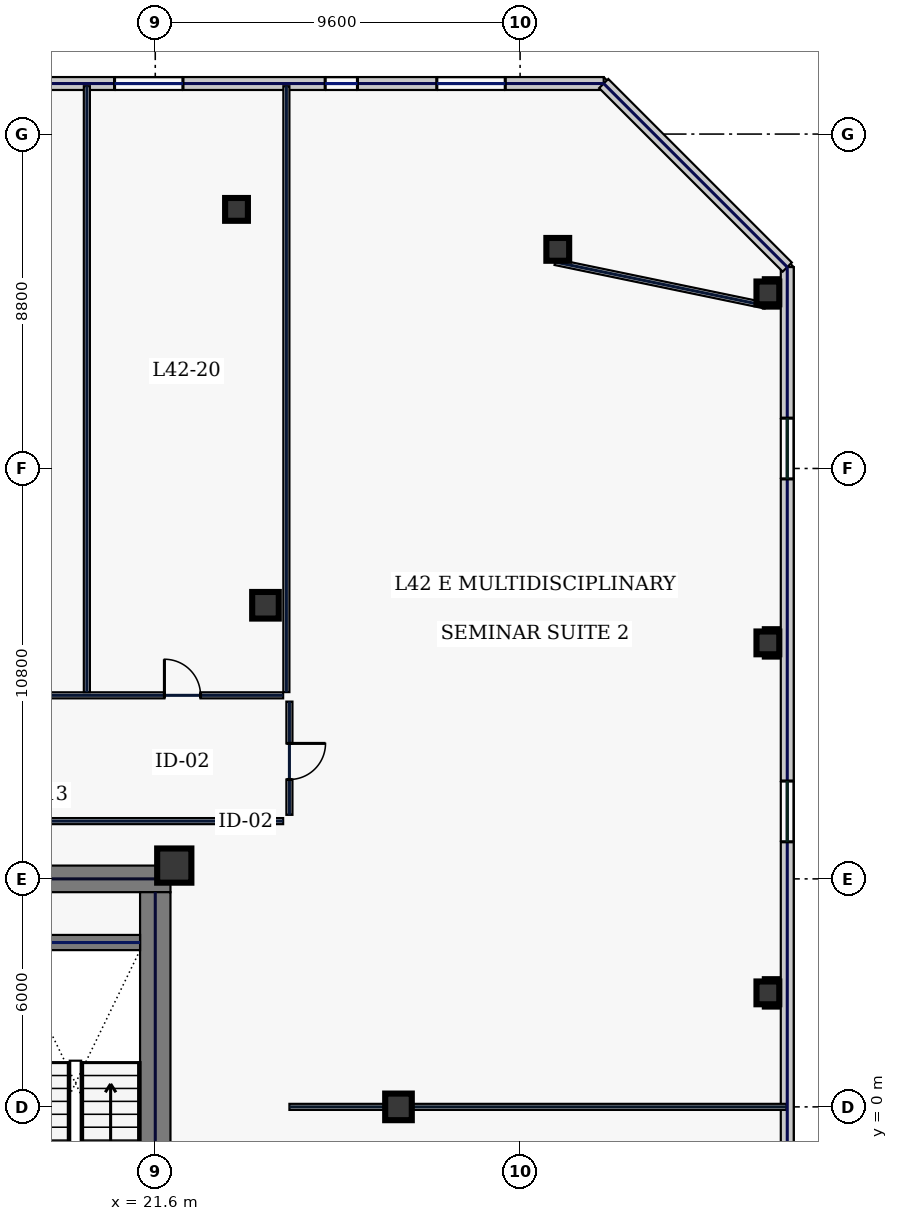
"""IFC4 building model, lengths in metres.
Left out: names, types, materials, properties, quantities, classifications, styles, units other than length and angle.
Written with IfcOpenShell. Run it as: python <this file> out.ifc"""

import sys

from ifc_helpers import new_model, si_unit, direction, frame, frame_2d, origin, origin_2d, place, context, subcontext, project, spatial, rectangle, hollow_rectangle, extrude, element, fill, save


model = new_model("IFC4")
c1 = context("Model", 3, precision=1e-05, world=origin(), true_north=direction((0.0, 1.0)))
c2 = subcontext(c1, "Body", "Model", "MODEL_VIEW")
j1 = project(units=[si_unit("LENGTHUNIT", "METRE"), si_unit("PLANEANGLEUNIT", "RADIAN")], contexts=[c1])
p1 = place(None, origin())
s1 = spatial("IfcSite", under=j1, at=p1, CompositionType="ELEMENT")
p2 = place(p1, origin())
s2 = spatial("IfcBuilding", under=s1, at=p2, CompositionType="ELEMENT")
p3 = place(p2, frame((0.0, 0.0, 184.2)))
s3 = spatial("IfcBuildingStorey", under=s2, at=p3, CompositionType="ELEMENT", Elevation=184.2)
p4 = place(p3, frame((10.45, 6.0, 0.0), z_axis=(0.0, 0.0, 1.0), x_axis=(1.0, 0.0, 0.0)))
e1 = element("IfcWall", 1, at=p4, inside=s3, PredefinedType="SHEAR", context=c2, shape_type="SweptSolid", body=[
    extrude(rectangle(XDim=11.55, YDim=0.7, at=frame_2d((5.775, 0.0))), origin(), (0.0, 0.0, 1.0), 3.74),
])
p5 = place(p3, frame((21.6, -5.65, 0.0), z_axis=(0.0, 0.0, 1.0), x_axis=(0.0, 1.0, 0.0)))
e2 = element("IfcWall", 2, at=p5, inside=s3, PredefinedType="SHEAR", context=c2, shape_type="SweptSolid", body=[
    extrude(rectangle(XDim=11.3, YDim=0.8, at=frame_2d((5.65, 0.0))), origin(), (0.0, 0.0, 1.0), 3.74),
])
p6 = place(p3, frame((17.8, 4.325, 0.0), z_axis=(0.0, 0.0, 1.0), x_axis=(1.0, 0.0, 0.0)))
e3 = element("IfcWall", 3, at=p6, inside=s3, PredefinedType="SHEAR", context=c2, shape_type="SweptSolid", body=[
    extrude(rectangle(XDim=3.4, YDim=0.4, at=frame_2d((1.7, 0.0))), origin(), (0.0, 0.0, 1.0), 3.74),
])
p7 = place(p3, frame((22.1, 6.35, 0.0), z_axis=(0.0, 0.0, 1.0), x_axis=(1.0, 0.0, 0.0)))
e4 = element("IfcColumn", 4, at=p7, inside=s3, PredefinedType="COLUMN", context=c2, shape_type="SweptSolid", body=[
    extrude(hollow_rectangle(XDim=0.9, YDim=0.9, WallThickness=0.04, at=origin_2d()), origin(), (0.0, 0.0, 1.0), 3.74),
])
for number, where, z_axis, x_axis in (
    (5, (24.5, 13.2, 0.0), (0.0, 0.0, 1.0), (1.0, 0.0, 0.0)),
    (6, (28.0, 0.0, 0.0), (0.0, 0.0, 1.0), (1.0, 0.0, 0.0)),
):
    element("IfcColumn", number, at=place(p3, frame(where, z_axis=z_axis, x_axis=x_axis)), inside=s3, PredefinedType="COLUMN", context=c2, shape_type="SweptSolid", body=[
        extrude(hollow_rectangle(XDim=0.7, YDim=0.7, WallThickness=0.032, at=origin_2d()), origin(), (0.0, 0.0, 1.0), 3.74),
    ])
for number, where, z_axis, x_axis in (
    (7, (32.191, 22.566, 0.0), (0.0, 0.0, 1.0), (1.0, 0.0, 0.0)),
    (8, (23.738, 23.618, 0.0), (0.0, 0.0, 1.0), (1.0, 0.0, 0.0)),
    (9, (37.72, 3.0, 0.0), (0.0, 0.0, 1.0), (1.0, 0.0, 0.0)),
    (10, (37.72, 12.21, 0.0), (0.0, 0.0, 1.0), (1.0, 0.0, 0.0)),
    (11, (37.72, 21.42, 0.0), (0.0, 0.0, 1.0), (1.0, 0.0, 0.0)),
):
    element("IfcColumn", number, at=place(p3, frame(where, z_axis=z_axis, x_axis=x_axis)), inside=s3, PredefinedType="COLUMN", context=c2, shape_type="SweptSolid", body=[
        extrude(hollow_rectangle(XDim=0.6, YDim=0.6, WallThickness=0.028, at=origin_2d()), origin(), (0.0, 0.0, 1.0), 3.74),
    ])
p8 = place(p3, frame((33.4, 26.93, 0.0), z_axis=(0.0, 0.0, 1.0), x_axis=(-1.0, 0.0, 0.0)))
e12 = element("IfcWall", 12, at=p8, inside=s3, PredefinedType="STANDARD", context=c2, shape_type="SweptSolid", body=[
    extrude(rectangle(XDim=15.95, YDim=0.34, at=frame_2d((7.975, 0.0))), origin(), (0.0, 0.0, 1.0), 3.74),
])
p9 = place(p8, frame((11.071, 0.0, 0.7)))
e13 = element("IfcOpeningElement", 13, at=p9, cuts=e12, PredefinedType="OPENING", context=c2, shape_type="SweptSolid", body=[
    extrude(rectangle(XDim=1.8, YDim=2.2, at=frame_2d((0.9, 1.1))), frame((0.0, 0.18, 0.0), z_axis=(0.0, -1.0, 0.0), x_axis=(1.0, 0.0, 0.0)), (0.0, 0.0, 1.0), 0.36),
])
p10 = place(p8, frame((6.48, 0.0, 0.7)))
e14 = element("IfcOpeningElement", 14, at=p10, cuts=e12, PredefinedType="OPENING", context=c2, shape_type="SweptSolid", body=[
    extrude(rectangle(XDim=0.85, YDim=1.85, at=frame_2d((0.425, 0.925))), frame((0.0, 0.18, 0.0), z_axis=(0.0, -1.0, 0.0), x_axis=(1.0, 0.0, 0.0)), (0.0, 0.0, 1.0), 0.36),
])
p11 = place(p8, frame((2.591, 0.0, 0.7)))
e15 = element("IfcOpeningElement", 15, at=p11, cuts=e12, PredefinedType="OPENING", context=c2, shape_type="SweptSolid", body=[
    extrude(rectangle(XDim=1.8, YDim=2.2, at=frame_2d((0.9, 1.1))), frame((0.0, 0.18, 0.0), z_axis=(0.0, -1.0, 0.0), x_axis=(1.0, 0.0, 0.0)), (0.0, 0.0, 1.0), 0.36),
])
p12 = place(p3, frame((38.23, -16.1, 0.0), z_axis=(0.0, 0.0, 1.0), x_axis=(0.0, 1.0, 0.0)))
e16 = element("IfcWall", 16, at=p12, inside=s3, PredefinedType="STANDARD", context=c2, shape_type="SweptSolid", body=[
    extrude(rectangle(XDim=38.2, YDim=0.34, at=frame_2d((19.1, 0.0))), origin(), (0.0, 0.0, 1.0), 3.74),
])
p13 = place(p12, frame((3.975, 0.0, 0.58)))
e17 = element("IfcOpeningElement", 17, at=p13, cuts=e16, PredefinedType="OPENING", context=c2, shape_type="SweptSolid", body=[
    extrude(rectangle(XDim=1.6, YDim=2.3, at=frame_2d((0.8, 1.15))), frame((0.0, 0.18, 0.0), z_axis=(0.0, -1.0, 0.0), x_axis=(1.0, 0.0, 0.0)), (0.0, 0.0, 1.0), 0.36),
])
p14 = place(p12, frame((13.525, 0.0, 0.58)))
e18 = element("IfcOpeningElement", 18, at=p14, cuts=e16, PredefinedType="OPENING", context=c2, shape_type="SweptSolid", body=[
    extrude(rectangle(XDim=1.6, YDim=2.3, at=frame_2d((0.8, 1.15))), frame((0.0, 0.18, 0.0), z_axis=(0.0, -1.0, 0.0), x_axis=(1.0, 0.0, 0.0)), (0.0, 0.0, 1.0), 0.36),
])
p15 = place(p12, frame((23.075, 0.0, 0.58)))
e19 = element("IfcOpeningElement", 19, at=p15, cuts=e16, PredefinedType="OPENING", context=c2, shape_type="SweptSolid", body=[
    extrude(rectangle(XDim=1.6, YDim=2.3, at=frame_2d((0.8, 1.15))), frame((0.0, 0.18, 0.0), z_axis=(0.0, -1.0, 0.0), x_axis=(1.0, 0.0, 0.0)), (0.0, 0.0, 1.0), 0.36),
])
p16 = place(p12, frame((32.625, 0.0, 0.58)))
e20 = element("IfcOpeningElement", 20, at=p16, cuts=e16, PredefinedType="OPENING", context=c2, shape_type="SweptSolid", body=[
    extrude(rectangle(XDim=1.6, YDim=2.3, at=frame_2d((0.8, 1.15))), frame((0.0, 0.18, 0.0), z_axis=(0.0, -1.0, 0.0), x_axis=(1.0, 0.0, 0.0)), (0.0, 0.0, 1.0), 0.36),
])
p17 = place(p3, frame((38.23, 22.1, 0.0), z_axis=(0.0, 0.0, 1.0), x_axis=(-0.707124652085, 0.707088909836, 0.0)))
e21 = element("IfcWall", 21, at=p17, inside=s3, PredefinedType="STANDARD", context=c2, shape_type="SweptSolid", body=[
    extrude(rectangle(XDim=6.831, YDim=0.34, at=frame_2d((3.415, 0.0))), origin(), (0.0, 0.0, 1.0), 3.74),
])
p18 = place(p3, frame((37.651, 21.087, 0.0), z_axis=(0.0, 0.0, 1.0), x_axis=(-0.979184618318, 0.202971631636, 0.0)))
e22 = element("IfcWall", 22, at=p18, inside=s3, PredefinedType="PARTITIONING", context=c2, shape_type="SweptSolid", body=[
    extrude(rectangle(XDim=5.646, YDim=0.16, at=frame_2d((2.823, 0.0))), origin(), (0.0, 0.0, 1.0), 3.74),
])
p19 = place(p3, frame((-24.965, 10.83, 0.0), z_axis=(0.0, 0.0, 1.0), x_axis=(1.0, 0.0, 0.0)))
e23 = element("IfcWall", 23, at=p19, inside=s3, PredefinedType="PARTITIONING", context=c2, shape_type="SweptSolid", body=[
    extrude(rectangle(XDim=49.93, YDim=0.16, at=frame_2d((24.965, 0.0))), origin(), (0.0, 0.0, 1.0), 3.74),
])
p20 = place(p19, frame((2.044, 0.0, 0.0)))
e24 = element("IfcOpeningElement", 24, at=p20, cuts=e23, PredefinedType="OPENING", context=c2, shape_type="SweptSolid", body=[
    extrude(rectangle(XDim=0.95, YDim=2.2, at=frame_2d((0.475, 1.1))), frame((0.0, 0.09, 0.0), z_axis=(0.0, -1.0, 0.0), x_axis=(1.0, 0.0, 0.0)), (0.0, 0.0, 1.0), 0.18),
])
p21 = place(p19, frame((7.3, 0.0, 0.0)))
e25 = element("IfcOpeningElement", 25, at=p21, cuts=e23, PredefinedType="OPENING", context=c2, shape_type="SweptSolid", body=[
    extrude(rectangle(XDim=1.45, YDim=2.2, at=frame_2d((0.725, 1.1))), frame((0.0, 0.09, 0.0), z_axis=(0.0, -1.0, 0.0), x_axis=(1.0, 0.0, 0.0)), (0.0, 0.0, 1.0), 0.18),
])
p22 = place(p19, frame((13.775, 0.0, 0.0)))
e26 = element("IfcOpeningElement", 26, at=p22, cuts=e23, PredefinedType="OPENING", context=c2, shape_type="SweptSolid", body=[
    extrude(rectangle(XDim=1.3, YDim=2.2, at=frame_2d((0.65, 1.1))), frame((0.0, 0.09, 0.0), z_axis=(0.0, -1.0, 0.0), x_axis=(1.0, 0.0, 0.0)), (0.0, 0.0, 1.0), 0.18),
])
p23 = place(p19, frame((19.85, 0.0, 0.0)))
e27 = element("IfcOpeningElement", 27, at=p23, cuts=e23, PredefinedType="OPENING", context=c2, shape_type="SweptSolid", body=[
    extrude(rectangle(XDim=1.15, YDim=2.2, at=frame_2d((0.575, 1.1))), frame((0.0, 0.09, 0.0), z_axis=(0.0, -1.0, 0.0), x_axis=(1.0, 0.0, 0.0)), (0.0, 0.0, 1.0), 0.18),
])
p24 = place(p19, frame((25.5, 0.0, 0.0)))
e28 = element("IfcOpeningElement", 28, at=p24, cuts=e23, PredefinedType="OPENING", context=c2, shape_type="SweptSolid", body=[
    extrude(rectangle(XDim=0.95, YDim=2.2, at=frame_2d((0.475, 1.1))), frame((0.0, 0.09, 0.0), z_axis=(0.0, -1.0, 0.0), x_axis=(1.0, 0.0, 0.0)), (0.0, 0.0, 1.0), 0.18),
])
p25 = place(p19, frame((30.9, 0.0, 0.0)))
e29 = element("IfcOpeningElement", 29, at=p25, cuts=e23, PredefinedType="OPENING", context=c2, shape_type="SweptSolid", body=[
    extrude(rectangle(XDim=0.95, YDim=2.2, at=frame_2d((0.475, 1.1))), frame((0.0, 0.09, 0.0), z_axis=(0.0, -1.0, 0.0), x_axis=(1.0, 0.0, 0.0)), (0.0, 0.0, 1.0), 0.18),
])
p26 = place(p19, frame((36.395, 0.0, 0.0)))
e30 = element("IfcOpeningElement", 30, at=p26, cuts=e23, PredefinedType="OPENING", context=c2, shape_type="SweptSolid", body=[
    extrude(rectangle(XDim=1.3, YDim=2.2, at=frame_2d((0.65, 1.1))), frame((0.0, 0.09, 0.0), z_axis=(0.0, -1.0, 0.0), x_axis=(1.0, 0.0, 0.0)), (0.0, 0.0, 1.0), 0.18),
])
p27 = place(p19, frame((41.895, 0.0, 0.0)))
e31 = element("IfcOpeningElement", 31, at=p27, cuts=e23, PredefinedType="OPENING", context=c2, shape_type="SweptSolid", body=[
    extrude(rectangle(XDim=1.45, YDim=2.2, at=frame_2d((0.725, 1.1))), frame((0.0, 0.09, 0.0), z_axis=(0.0, -1.0, 0.0), x_axis=(1.0, 0.0, 0.0)), (0.0, 0.0, 1.0), 0.18),
])
p28 = place(p19, frame((46.806, 0.0, 0.0)))
e32 = element("IfcOpeningElement", 32, at=p28, cuts=e23, PredefinedType="OPENING", context=c2, shape_type="SweptSolid", body=[
    extrude(rectangle(XDim=0.95, YDim=2.2, at=frame_2d((0.475, 1.1))), frame((0.0, 0.09, 0.0), z_axis=(0.0, -1.0, 0.0), x_axis=(1.0, 0.0, 0.0)), (0.0, 0.0, 1.0), 0.18),
])
p29 = place(p3, frame((25.13, 10.665, 0.0), z_axis=(0.0, 0.0, 1.0), x_axis=(0.0, -1.0, 0.0)))
e33 = element("IfcWall", 33, at=p29, inside=s3, PredefinedType="PARTITIONING", context=c2, shape_type="SweptSolid", body=[
    extrude(rectangle(XDim=2.98, YDim=0.16, at=frame_2d((1.49, 0.0))), origin(), (0.0, 0.0, 1.0), 3.74),
])
p30 = place(p29, frame((1.1, 0.0, 0.0)))
e34 = element("IfcOpeningElement", 34, at=p30, cuts=e33, PredefinedType="OPENING", context=c2, shape_type="SweptSolid", body=[
    extrude(rectangle(XDim=0.95, YDim=2.2, at=frame_2d((0.475, 1.1))), frame((0.0, 0.09, 0.0), z_axis=(0.0, -1.0, 0.0), x_axis=(1.0, 0.0, 0.0)), (0.0, 0.0, 1.0), 0.18),
])
p31 = place(p3, frame((24.965, 7.52, 0.0), z_axis=(0.0, 0.0, 1.0), x_axis=(-1.0, 0.0, 0.0)))
e35 = element("IfcWall", 35, at=p31, inside=s3, PredefinedType="PARTITIONING", context=c2, shape_type="SweptSolid", body=[
    extrude(rectangle(XDim=14.25, YDim=0.16, at=frame_2d((7.125, 0.0))), origin(), (0.0, 0.0, 1.0), 3.74),
])
for number, where, z_axis, x_axis in (
    (36, (25.05, 10.915, 0.0), (0.0, 0.0, 1.0), (0.0, 1.0, 0.0)),
    (37, (19.8, 10.915, 0.0), (0.0, 0.0, 1.0), (0.0, 1.0, 0.0)),
):
    element("IfcWall", number, at=place(p3, frame(where, z_axis=z_axis, x_axis=x_axis)), inside=s3, PredefinedType="PARTITIONING", context=c2, shape_type="SweptSolid", body=[
        extrude(rectangle(XDim=15.945, YDim=0.16, at=frame_2d((7.973, 0.0))), origin(), (0.0, 0.0, 1.0), 3.74),
    ])
p32 = place(p3, frame((25.13, 0.0, 0.0), z_axis=(0.0, 0.0, 1.0), x_axis=(1.0, 0.0, 0.0)))
e38 = element("IfcWall", 38, at=p32, inside=s3, PredefinedType="PARTITIONING", context=c2, shape_type="SweptSolid", body=[
    extrude(rectangle(XDim=13.08, YDim=0.16, at=frame_2d((6.54, 0.0))), origin(), (0.0, 0.0, 1.0), 3.285),
])
p33 = place(p9, origin())
e39 = element("IfcWindow", 39, at=p33, inside=s3, PartitioningType="SINGLE_PANEL", PredefinedType="WINDOW", context=c2, shape_type="SweptSolid", body=[
    extrude(rectangle(XDim=1.8, YDim=2.2, at=frame_2d((0.9, 1.1))), frame((0.0, 0.03, 0.0), z_axis=(0.0, -1.0, 0.0), x_axis=(1.0, 0.0, 0.0)), (0.0, 0.0, 1.0), 0.06),
])
fill(e13, e39)
p34 = place(p10, origin())
e40 = element("IfcWindow", 40, at=p34, inside=s3, PartitioningType="SINGLE_PANEL", PredefinedType="WINDOW", context=c2, shape_type="SweptSolid", body=[
    extrude(rectangle(XDim=0.85, YDim=1.85, at=frame_2d((0.425, 0.925))), frame((0.0, 0.03, 0.0), z_axis=(0.0, -1.0, 0.0), x_axis=(1.0, 0.0, 0.0)), (0.0, 0.0, 1.0), 0.06),
])
fill(e14, e40)
p35 = place(p11, origin())
e41 = element("IfcWindow", 41, at=p35, inside=s3, PartitioningType="SINGLE_PANEL", PredefinedType="WINDOW", context=c2, shape_type="SweptSolid", body=[
    extrude(rectangle(XDim=1.8, YDim=2.2, at=frame_2d((0.9, 1.1))), frame((0.0, 0.03, 0.0), z_axis=(0.0, -1.0, 0.0), x_axis=(1.0, 0.0, 0.0)), (0.0, 0.0, 1.0), 0.06),
])
fill(e15, e41)
p36 = place(p15, origin())
e42 = element("IfcWindow", 42, at=p36, inside=s3, PartitioningType="SINGLE_PANEL", PredefinedType="WINDOW", context=c2, shape_type="SweptSolid", body=[
    extrude(rectangle(XDim=1.6, YDim=2.3, at=frame_2d((0.8, 1.15))), frame((0.0, 0.03, 0.0), z_axis=(0.0, -1.0, 0.0), x_axis=(1.0, 0.0, 0.0)), (0.0, 0.0, 1.0), 0.06),
])
fill(e19, e42)
p37 = place(p16, origin())
e43 = element("IfcWindow", 43, at=p37, inside=s3, PartitioningType="SINGLE_PANEL", PredefinedType="WINDOW", context=c2, shape_type="SweptSolid", body=[
    extrude(rectangle(XDim=1.6, YDim=2.3, at=frame_2d((0.8, 1.15))), frame((0.0, 0.03, 0.0), z_axis=(0.0, -1.0, 0.0), x_axis=(1.0, 0.0, 0.0)), (0.0, 0.0, 1.0), 0.06),
])
fill(e20, e43)
p38 = place(p28, origin())
e44 = element("IfcDoor", 44, at=p38, inside=s3, OperationType="SINGLE_SWING_LEFT", PredefinedType="DOOR", context=c2, shape_type="SweptSolid", body=[
    extrude(rectangle(XDim=0.95, YDim=2.2, at=frame_2d((0.475, 1.1))), frame((0.0, 0.025, 0.0), z_axis=(0.0, -1.0, 0.0), x_axis=(1.0, 0.0, 0.0)), (0.0, 0.0, 1.0), 0.05),
])
fill(e32, e44)
p39 = place(p30, origin())
e45 = element("IfcDoor", 45, at=p39, inside=s3, OperationType="SINGLE_SWING_LEFT", PredefinedType="DOOR", context=c2, shape_type="SweptSolid", body=[
    extrude(rectangle(XDim=0.95, YDim=2.2, at=frame_2d((0.475, 1.1))), frame((0.0, 0.025, 0.0), z_axis=(0.0, -1.0, 0.0), x_axis=(1.0, 0.0, 0.0)), (0.0, 0.0, 1.0), 0.05),
])
fill(e34, e45)
save(model, sys.argv[1])
